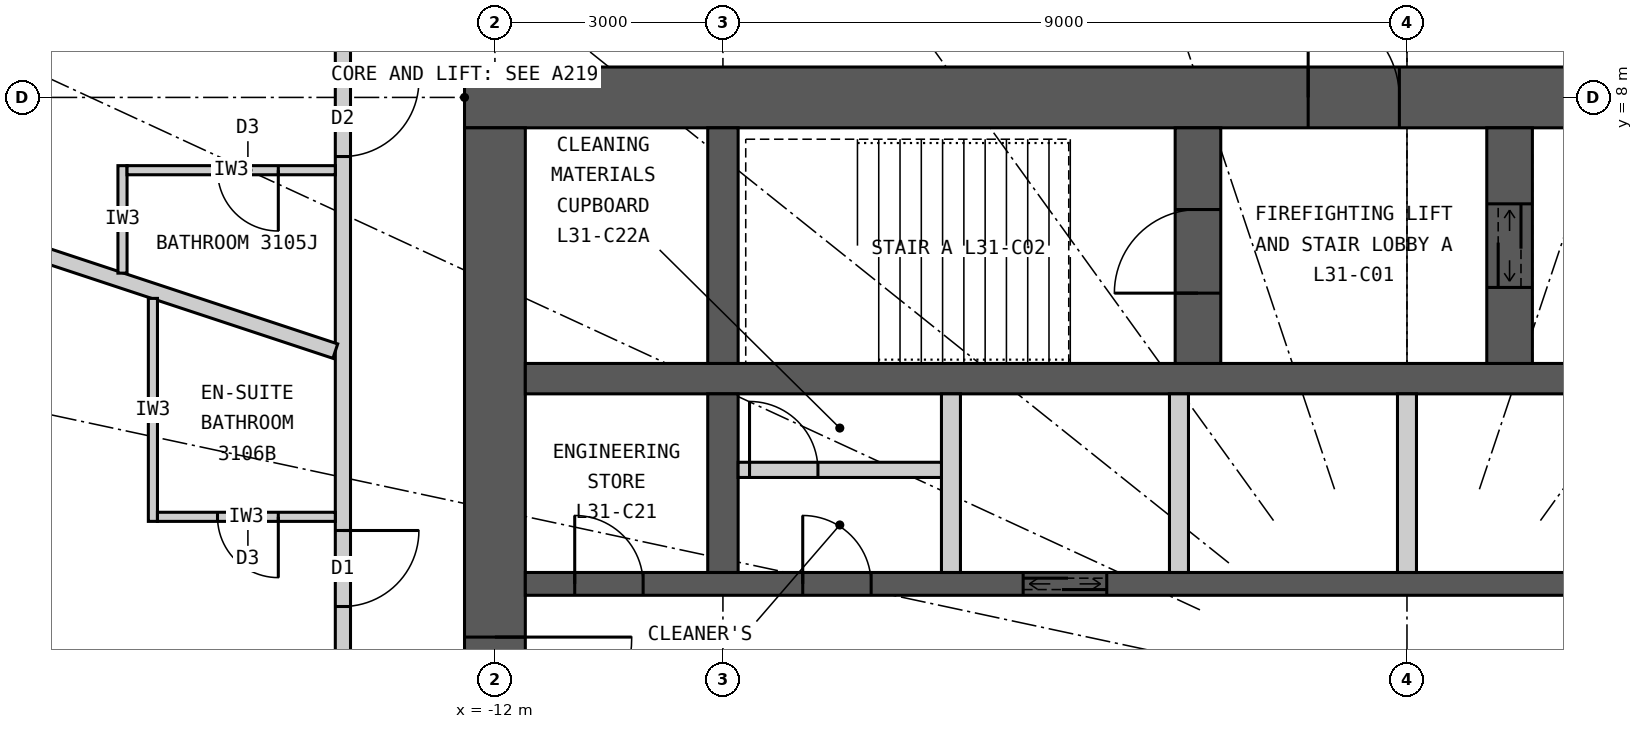
"""IFC4 building model, lengths in metres.
Left out: names, types, materials, properties, quantities, classifications, styles, units other than length and angle.
Written with IfcOpenShell. Run it as: python <this file> out.ifc"""

import sys

from ifc_helpers import new_model, si_unit, direction, frame, frame_2d, origin, place, context, subcontext, project, spatial, rectangle, extrude, element, fill, save


model = new_model("IFC4")
c1 = context("Model", 3, precision=1e-05, world=origin(), true_north=direction((0.0, 1.0)))
c2 = subcontext(c1, "Body", "Model", "MODEL_VIEW")
j1 = project(units=[si_unit("LENGTHUNIT", "METRE"), si_unit("PLANEANGLEUNIT", "RADIAN")], contexts=[c1])
p1 = place(None, origin())
s1 = spatial("IfcSite", under=j1, at=p1, CompositionType="ELEMENT")
p2 = place(p1, origin())
s2 = spatial("IfcBuilding", under=s1, at=p2, CompositionType="ELEMENT")
p3 = place(p2, frame((0.0, 0.0, 122.1)))
s3 = spatial("IfcBuildingStorey", under=s2, at=p3, CompositionType="ELEMENT", Elevation=122.1)
p4 = place(p3, frame((-12.4, 8.0, 0.0), z_axis=(0.0, 0.0, 1.0), x_axis=(1.0, 0.0, 0.0)))
e1 = element("IfcWall", 1, at=p4, inside=s3, PredefinedType="SHEAR", context=c2, shape_type="SweptSolid", body=[
    extrude(rectangle(XDim=24.8, YDim=0.8, at=frame_2d((12.4, 0.0))), origin(), (0.0, 0.0, 1.0), 3.3),
])
p5 = place(p4, frame((11.1, 0.0, 0.0)))
e2 = element("IfcOpeningElement", 2, at=p5, cuts=e1, PredefinedType="OPENING", context=c2, shape_type="SweptSolid", body=[
    extrude(rectangle(XDim=1.2, YDim=2.2, at=frame_2d((0.6, 1.1))), frame((0.0, 0.41, 0.0), z_axis=(0.0, -1.0, 0.0), x_axis=(1.0, 0.0, 0.0)), (0.0, 0.0, 1.0), 0.82),
])
p6 = place(p4, frame((18.7, 0.0, 0.0)))
e3 = element("IfcOpeningElement", 3, at=p6, cuts=e1, PredefinedType="OPENING", context=c2, shape_type="SweptSolid", body=[
    extrude(rectangle(XDim=0.9, YDim=2.2, at=frame_2d((0.45, 1.1))), frame((0.0, 0.41, 0.0), z_axis=(0.0, -1.0, 0.0), x_axis=(1.0, 0.0, 0.0)), (0.0, 0.0, 1.0), 0.82),
])
p7 = place(p3, frame((-12.0, 7.6, 0.0), z_axis=(0.0, 0.0, 1.0), x_axis=(0.0, -1.0, 0.0)))
e4 = element("IfcWall", 4, at=p7, inside=s3, PredefinedType="SHEAR", context=c2, shape_type="SweptSolid", body=[
    extrude(rectangle(XDim=15.2, YDim=0.8, at=frame_2d((7.6, 0.0))), origin(), (0.0, 0.0, 1.0), 3.3),
])
p8 = place(p7, frame((6.7, 0.0, 0.0)))
e5 = element("IfcOpeningElement", 5, at=p8, cuts=e4, PredefinedType="OPENING", context=c2, shape_type="SweptSolid", body=[
    extrude(rectangle(XDim=1.8, YDim=2.2, at=frame_2d((0.9, 1.1))), frame((0.0, 0.41, 0.0), z_axis=(0.0, -1.0, 0.0), x_axis=(1.0, 0.0, 0.0)), (0.0, 0.0, 1.0), 0.82),
])
p9 = place(p3, frame((-11.6, 4.3, 0.0), z_axis=(0.0, 0.0, 1.0), x_axis=(1.0, 0.0, 0.0)))
e6 = element("IfcWall", 6, at=p9, inside=s3, PredefinedType="SHEAR", context=c2, shape_type="SweptSolid", body=[
    extrude(rectangle(XDim=23.2, YDim=0.4, at=frame_2d((11.6, 0.0))), origin(), (0.0, 0.0, 1.0), 3.3),
])
p10 = place(p3, frame((-11.6, 1.6, 0.0), z_axis=(0.0, 0.0, 1.0), x_axis=(1.0, 0.0, 0.0)))
e7 = element("IfcWall", 7, at=p10, inside=s3, PredefinedType="SHEAR", context=c2, shape_type="SweptSolid", body=[
    extrude(rectangle(XDim=23.2, YDim=0.3, at=frame_2d((11.6, 0.0))), origin(), (0.0, 0.0, 1.0), 3.3),
])
p11 = place(p10, frame((6.55, 0.0, 0.0)))
e8 = element("IfcOpeningElement", 8, at=p11, cuts=e7, PredefinedType="OPENING", context=c2, shape_type="SweptSolid", body=[
    extrude(rectangle(XDim=1.1, YDim=2.2, at=frame_2d((0.55, 1.1))), frame((0.0, 0.16, 0.0), z_axis=(0.0, -1.0, 0.0), x_axis=(1.0, 0.0, 0.0)), (0.0, 0.0, 1.0), 0.32),
])
p12 = place(p10, frame((0.65, 0.0, 0.0)))
e9 = element("IfcOpeningElement", 9, at=p12, cuts=e7, PredefinedType="OPENING", context=c2, shape_type="SweptSolid", body=[
    extrude(rectangle(XDim=0.9, YDim=2.2, at=frame_2d((0.45, 1.1))), frame((0.0, 0.16, 0.0), z_axis=(0.0, -1.0, 0.0), x_axis=(1.0, 0.0, 0.0)), (0.0, 0.0, 1.0), 0.32),
])
p13 = place(p10, frame((3.65, 0.0, 0.0)))
e10 = element("IfcOpeningElement", 10, at=p13, cuts=e7, PredefinedType="OPENING", context=c2, shape_type="SweptSolid", body=[
    extrude(rectangle(XDim=0.9, YDim=2.2, at=frame_2d((0.45, 1.1))), frame((0.0, 0.16, 0.0), z_axis=(0.0, -1.0, 0.0), x_axis=(1.0, 0.0, 0.0)), (0.0, 0.0, 1.0), 0.32),
])
p14 = place(p10, frame((21.65, 0.0, 0.0)))
e11 = element("IfcOpeningElement", 11, at=p14, cuts=e7, PredefinedType="OPENING", context=c2, shape_type="SweptSolid", body=[
    extrude(rectangle(XDim=0.9, YDim=2.2, at=frame_2d((0.45, 1.1))), frame((0.0, 0.16, 0.0), z_axis=(0.0, -1.0, 0.0), x_axis=(1.0, 0.0, 0.0)), (0.0, 0.0, 1.0), 0.32),
])
p15 = place(p3, frame((-9.0, 4.5, 0.0), z_axis=(0.0, 0.0, 1.0), x_axis=(0.0, 1.0, 0.0)))
e12 = element("IfcWall", 12, at=p15, inside=s3, PredefinedType="SHEAR", context=c2, shape_type="SweptSolid", body=[
    extrude(rectangle(XDim=3.1, YDim=0.4, at=frame_2d((1.55, 0.0))), origin(), (0.0, 0.0, 1.0), 3.3),
])
p16 = place(p3, frame((-9.0, 1.75, 0.0), z_axis=(0.0, 0.0, 1.0), x_axis=(0.0, 1.0, 0.0)))
e13 = element("IfcWall", 13, at=p16, inside=s3, PredefinedType="SHEAR", context=c2, shape_type="SweptSolid", body=[
    extrude(rectangle(XDim=2.35, YDim=0.4, at=frame_2d((1.175, 0.0))), origin(), (0.0, 0.0, 1.0), 3.3),
])
p17 = place(p3, frame((-2.75, 4.5, 0.0), z_axis=(0.0, 0.0, 1.0), x_axis=(0.0, 1.0, 0.0)))
e14 = element("IfcWall", 14, at=p17, inside=s3, PredefinedType="SHEAR", context=c2, shape_type="SweptSolid", body=[
    extrude(rectangle(XDim=3.1, YDim=0.6, at=frame_2d((1.55, 0.0))), origin(), (0.0, 0.0, 1.0), 3.3),
])
p18 = place(p17, frame((0.925, 0.0, 0.0)))
e15 = element("IfcOpeningElement", 15, at=p18, cuts=e14, PredefinedType="OPENING", context=c2, shape_type="SweptSolid", body=[
    extrude(rectangle(XDim=1.1, YDim=2.2, at=frame_2d((0.55, 1.1))), frame((0.0, 0.31, 0.0), z_axis=(0.0, -1.0, 0.0), x_axis=(1.0, 0.0, 0.0)), (0.0, 0.0, 1.0), 0.62),
])
p19 = place(p3, frame((1.35, 4.5, 0.0), z_axis=(0.0, 0.0, 1.0), x_axis=(0.0, 1.0, 0.0)))
e16 = element("IfcWall", 16, at=p19, inside=s3, PredefinedType="SHEAR", context=c2, shape_type="SweptSolid", body=[
    extrude(rectangle(XDim=3.1, YDim=0.6, at=frame_2d((1.55, 0.0))), origin(), (0.0, 0.0, 1.0), 3.3),
])
p20 = place(p19, frame((1.0, 0.0, 0.0)))
e17 = element("IfcOpeningElement", 17, at=p20, cuts=e16, PredefinedType="OPENING", context=c2, shape_type="SweptSolid", body=[
    extrude(rectangle(XDim=1.1, YDim=2.2, at=frame_2d((0.55, 1.1))), frame((0.0, 0.31, 0.0), z_axis=(0.0, -1.0, 0.0), x_axis=(1.0, 0.0, 0.0)), (0.0, 0.0, 1.0), 0.62),
])
for number, where, z_axis, x_axis in (
    (18, (-6.0, 1.75, 0.0), (0.0, 0.0, 1.0), (0.0, 1.0, 0.0)),
    (19, (-3.0, 1.75, 0.0), (0.0, 0.0, 1.0), (0.0, 1.0, 0.0)),
    (20, (0.0, 1.75, 0.0), (0.0, 0.0, 1.0), (0.0, 1.0, 0.0)),
):
    element("IfcWall", number, at=place(p3, frame(where, z_axis=z_axis, x_axis=x_axis)), inside=s3, PredefinedType="PARTITIONING", context=c2, shape_type="SweptSolid", body=[
        extrude(rectangle(XDim=2.35, YDim=0.25, at=frame_2d((1.175, 0.0))), origin(), (0.0, 0.0, 1.0), 3.3),
    ])
p21 = place(p3, frame((-14.0, 9.9, 0.0), z_axis=(0.0, 0.0, 1.0), x_axis=(0.0, -1.0, 0.0)))
e21 = element("IfcWall", 21, at=p21, inside=s3, PredefinedType="PARTITIONING", context=c2, shape_type="SweptSolid", body=[
    extrude(rectangle(XDim=19.8, YDim=0.2, at=frame_2d((9.9, 0.0))), origin(), (0.0, 0.0, 1.0), 3.12),
])
p22 = place(p21, frame((1.678, 0.0, 0.0)))
e22 = element("IfcOpeningElement", 22, at=p22, cuts=e21, PredefinedType="OPENING", context=c2, shape_type="SweptSolid", body=[
    extrude(rectangle(XDim=1.0, YDim=2.2, at=frame_2d((0.5, 1.1))), frame((0.0, 0.11, 0.0), z_axis=(0.0, -1.0, 0.0), x_axis=(1.0, 0.0, 0.0)), (0.0, 0.0, 1.0), 0.22),
])
p23 = place(p21, frame((7.598, 0.0, 0.0)))
e23 = element("IfcOpeningElement", 23, at=p23, cuts=e21, PredefinedType="OPENING", context=c2, shape_type="SweptSolid", body=[
    extrude(rectangle(XDim=1.0, YDim=2.2, at=frame_2d((0.5, 1.1))), frame((0.0, 0.11, 0.0), z_axis=(0.0, -1.0, 0.0), x_axis=(1.0, 0.0, 0.0)), (0.0, 0.0, 1.0), 0.22),
])
p24 = place(p21, frame((12.26, 0.0, 0.0)))
e24 = element("IfcOpeningElement", 24, at=p24, cuts=e21, PredefinedType="OPENING", context=c2, shape_type="SweptSolid", body=[
    extrude(rectangle(XDim=1.0, YDim=2.2, at=frame_2d((0.5, 1.1))), frame((0.0, 0.11, 0.0), z_axis=(0.0, -1.0, 0.0), x_axis=(1.0, 0.0, 0.0)), (0.0, 0.0, 1.0), 0.22),
])
p25 = place(p21, frame((16.922, 0.0, 0.0)))
e25 = element("IfcOpeningElement", 25, at=p25, cuts=e21, PredefinedType="OPENING", context=c2, shape_type="SweptSolid", body=[
    extrude(rectangle(XDim=1.0, YDim=2.2, at=frame_2d((0.5, 1.1))), frame((0.0, 0.11, 0.0), z_axis=(0.0, -1.0, 0.0), x_axis=(1.0, 0.0, 0.0)), (0.0, 0.0, 1.0), 0.22),
])
p26 = place(p3, frame((-14.1, 4.662, 0.0), z_axis=(0.0, 0.0, 1.0), x_axis=(-0.949446466373, 0.313928984789, 0.0)))
e26 = element("IfcWall", 26, at=p26, inside=s3, PredefinedType="PARTITIONING", context=c2, shape_type="SweptSolid", body=[
    extrude(rectangle(XDim=8.797, YDim=0.2, at=frame_2d((4.399, 0.0))), origin(), (0.0, 0.0, 1.0), 3.12),
])
p27 = place(p3, frame((-16.9, 5.688, 0.0), z_axis=(0.0, 0.0, 1.0), x_axis=(0.0, 1.0, 0.0)))
e27 = element("IfcWall", 27, at=p27, inside=s3, PredefinedType="PARTITIONING", context=c2, shape_type="SweptSolid", body=[
    extrude(rectangle(XDim=1.414, YDim=0.12, at=frame_2d((0.707, 0.0))), origin(), (0.0, 0.0, 1.0), 3.12),
])
p28 = place(p3, frame((-14.1, 7.042, 0.0), z_axis=(0.0, 0.0, 1.0), x_axis=(-1.0, 0.0, 0.0)))
e28 = element("IfcWall", 28, at=p28, inside=s3, PredefinedType="PARTITIONING", context=c2, shape_type="SweptSolid", body=[
    extrude(rectangle(XDim=2.74, YDim=0.12, at=frame_2d((1.37, 0.0))), origin(), (0.0, 0.0, 1.0), 3.12),
])
p29 = place(p28, frame((0.75, 0.0, 0.0)))
e29 = element("IfcOpeningElement", 29, at=p29, cuts=e28, PredefinedType="OPENING", context=c2, shape_type="SweptSolid", body=[
    extrude(rectangle(XDim=0.8, YDim=2.1, at=frame_2d((0.4, 1.05))), frame((0.0, 0.07, 0.0), z_axis=(0.0, -1.0, 0.0), x_axis=(1.0, 0.0, 0.0)), (0.0, 0.0, 1.0), 0.14),
])
p30 = place(p3, frame((-16.5, 5.356, 0.0), z_axis=(0.0, 0.0, 1.0), x_axis=(0.0, -1.0, 0.0)))
e30 = element("IfcWall", 30, at=p30, inside=s3, PredefinedType="PARTITIONING", context=c2, shape_type="SweptSolid", body=[
    extrude(rectangle(XDim=2.934, YDim=0.12, at=frame_2d((1.467, 0.0))), origin(), (0.0, 0.0, 1.0), 3.12),
])
p31 = place(p3, frame((-14.1, 2.482, 0.0), z_axis=(0.0, 0.0, 1.0), x_axis=(-1.0, 0.0, 0.0)))
e31 = element("IfcWall", 31, at=p31, inside=s3, PredefinedType="PARTITIONING", context=c2, shape_type="SweptSolid", body=[
    extrude(rectangle(XDim=2.34, YDim=0.12, at=frame_2d((1.17, 0.0))), origin(), (0.0, 0.0, 1.0), 3.12),
])
p32 = place(p31, frame((0.75, 0.0, 0.0)))
e32 = element("IfcOpeningElement", 32, at=p32, cuts=e31, PredefinedType="OPENING", context=c2, shape_type="SweptSolid", body=[
    extrude(rectangle(XDim=0.8, YDim=2.1, at=frame_2d((0.4, 1.05))), frame((0.0, 0.07, 0.0), z_axis=(0.0, -1.0, 0.0), x_axis=(1.0, 0.0, 0.0)), (0.0, 0.0, 1.0), 0.14),
])
p33 = place(p3, frame((-8.8, 3.1, 0.0), z_axis=(0.0, 0.0, 1.0), x_axis=(1.0, 0.0, 0.0)))
e33 = element("IfcWall", 33, at=p33, inside=s3, PredefinedType="PARTITIONING", context=c2, shape_type="SweptSolid", body=[
    extrude(rectangle(XDim=2.675, YDim=0.2, at=frame_2d((1.337, 0.0))), origin(), (0.0, 0.0, 1.0), 3.12),
])
p34 = place(p33, frame((0.15, 0.0, 0.0)))
e34 = element("IfcOpeningElement", 34, at=p34, cuts=e33, PredefinedType="OPENING", context=c2, shape_type="SweptSolid", body=[
    extrude(rectangle(XDim=0.9, YDim=2.2, at=frame_2d((0.45, 1.1))), frame((0.0, 0.11, 0.0), z_axis=(0.0, -1.0, 0.0), x_axis=(1.0, 0.0, 0.0)), (0.0, 0.0, 1.0), 0.22),
])
p35 = place(p29, origin())
e35 = element("IfcDoor", 35, at=p35, inside=s3, OperationType="SINGLE_SWING_LEFT", PredefinedType="DOOR", context=c2, shape_type="SweptSolid", body=[
    extrude(rectangle(XDim=0.8, YDim=2.1, at=frame_2d((0.4, 1.05))), frame((0.0, 0.025, 0.0), z_axis=(0.0, -1.0, 0.0), x_axis=(1.0, 0.0, 0.0)), (0.0, 0.0, 1.0), 0.05),
])
fill(e29, e35)
p36 = place(p22, origin())
e36 = element("IfcDoor", 36, at=p36, inside=s3, OperationType="SINGLE_SWING_LEFT", PredefinedType="DOOR", context=c2, shape_type="SweptSolid", body=[
    extrude(rectangle(XDim=1.0, YDim=2.2, at=frame_2d((0.5, 1.1))), frame((0.0, 0.025, 0.0), z_axis=(0.0, -1.0, 0.0), x_axis=(1.0, 0.0, 0.0)), (0.0, 0.0, 1.0), 0.05),
])
fill(e22, e36)
p37 = place(p32, origin())
e37 = element("IfcDoor", 37, at=p37, inside=s3, OperationType="SINGLE_SWING_LEFT", PredefinedType="DOOR", context=c2, shape_type="SweptSolid", body=[
    extrude(rectangle(XDim=0.8, YDim=2.1, at=frame_2d((0.4, 1.05))), frame((0.0, 0.025, 0.0), z_axis=(0.0, -1.0, 0.0), x_axis=(1.0, 0.0, 0.0)), (0.0, 0.0, 1.0), 0.05),
])
fill(e32, e37)
p38 = place(p23, origin())
e38 = element("IfcDoor", 38, at=p38, inside=s3, OperationType="SINGLE_SWING_LEFT", PredefinedType="DOOR", context=c2, shape_type="SweptSolid", body=[
    extrude(rectangle(XDim=1.0, YDim=2.2, at=frame_2d((0.5, 1.1))), frame((0.0, 0.025, 0.0), z_axis=(0.0, -1.0, 0.0), x_axis=(1.0, 0.0, 0.0)), (0.0, 0.0, 1.0), 0.05),
])
fill(e23, e38)
p39 = place(p5, origin())
e39 = element("IfcDoor", 39, at=p39, inside=s3, OperationType="SINGLE_SWING_LEFT", PredefinedType="DOOR", context=c2, shape_type="SweptSolid", body=[
    extrude(rectangle(XDim=1.2, YDim=2.2, at=frame_2d((0.6, 1.1))), frame((0.0, 0.025, 0.0), z_axis=(0.0, -1.0, 0.0), x_axis=(1.0, 0.0, 0.0)), (0.0, 0.0, 1.0), 0.05),
])
fill(e2, e39)
p40 = place(p18, origin())
e40 = element("IfcDoor", 40, at=p40, inside=s3, OperationType="SINGLE_SWING_LEFT", PredefinedType="DOOR", context=c2, shape_type="SweptSolid", body=[
    extrude(rectangle(XDim=1.1, YDim=2.2, at=frame_2d((0.55, 1.1))), frame((0.0, 0.025, 0.0), z_axis=(0.0, -1.0, 0.0), x_axis=(1.0, 0.0, 0.0)), (0.0, 0.0, 1.0), 0.05),
])
fill(e15, e40)
p41 = place(p20, origin())
e41 = element("IfcDoor", 41, at=p41, inside=s3, OperationType="DOUBLE_DOOR_SLIDING", PredefinedType="DOOR", context=c2, shape_type="SweptSolid", body=[
    extrude(rectangle(XDim=1.1, YDim=2.2, at=frame_2d((0.55, 1.1))), frame((0.0, 0.025, 0.0), z_axis=(0.0, -1.0, 0.0), x_axis=(1.0, 0.0, 0.0)), (0.0, 0.0, 1.0), 0.05),
])
fill(e17, e41)
p42 = place(p11, origin())
e42 = element("IfcDoor", 42, at=p42, inside=s3, OperationType="DOUBLE_DOOR_SLIDING", PredefinedType="DOOR", context=c2, shape_type="SweptSolid", body=[
    extrude(rectangle(XDim=1.1, YDim=2.2, at=frame_2d((0.55, 1.1))), frame((0.0, 0.025, 0.0), z_axis=(0.0, -1.0, 0.0), x_axis=(1.0, 0.0, 0.0)), (0.0, 0.0, 1.0), 0.05),
])
fill(e8, e42)
p43 = place(p12, origin())
e43 = element("IfcDoor", 43, at=p43, inside=s3, OperationType="SINGLE_SWING_LEFT", PredefinedType="DOOR", context=c2, shape_type="SweptSolid", body=[
    extrude(rectangle(XDim=0.9, YDim=2.2, at=frame_2d((0.45, 1.1))), frame((0.0, 0.025, 0.0), z_axis=(0.0, -1.0, 0.0), x_axis=(1.0, 0.0, 0.0)), (0.0, 0.0, 1.0), 0.05),
])
fill(e9, e43)
p44 = place(p34, origin())
e44 = element("IfcDoor", 44, at=p44, inside=s3, OperationType="SINGLE_SWING_LEFT", PredefinedType="DOOR", context=c2, shape_type="SweptSolid", body=[
    extrude(rectangle(XDim=0.9, YDim=2.2, at=frame_2d((0.45, 1.1))), frame((0.0, 0.025, 0.0), z_axis=(0.0, -1.0, 0.0), x_axis=(1.0, 0.0, 0.0)), (0.0, 0.0, 1.0), 0.05),
])
fill(e34, e44)
p45 = place(p13, origin())
e45 = element("IfcDoor", 45, at=p45, inside=s3, OperationType="SINGLE_SWING_LEFT", PredefinedType="DOOR", context=c2, shape_type="SweptSolid", body=[
    extrude(rectangle(XDim=0.9, YDim=2.2, at=frame_2d((0.45, 1.1))), frame((0.0, 0.025, 0.0), z_axis=(0.0, -1.0, 0.0), x_axis=(1.0, 0.0, 0.0)), (0.0, 0.0, 1.0), 0.05),
])
fill(e10, e45)
p46 = place(p8, origin())
e46 = element("IfcDoor", 46, at=p46, inside=s3, OperationType="DOUBLE_DOOR_DOUBLE_SWING", PredefinedType="DOOR", context=c2, shape_type="SweptSolid", body=[
    extrude(rectangle(XDim=1.8, YDim=2.2, at=frame_2d((0.9, 1.1))), frame((0.0, 0.025, 0.0), z_axis=(0.0, -1.0, 0.0), x_axis=(1.0, 0.0, 0.0)), (0.0, 0.0, 1.0), 0.05),
])
fill(e5, e46)
save(model, sys.argv[1])
